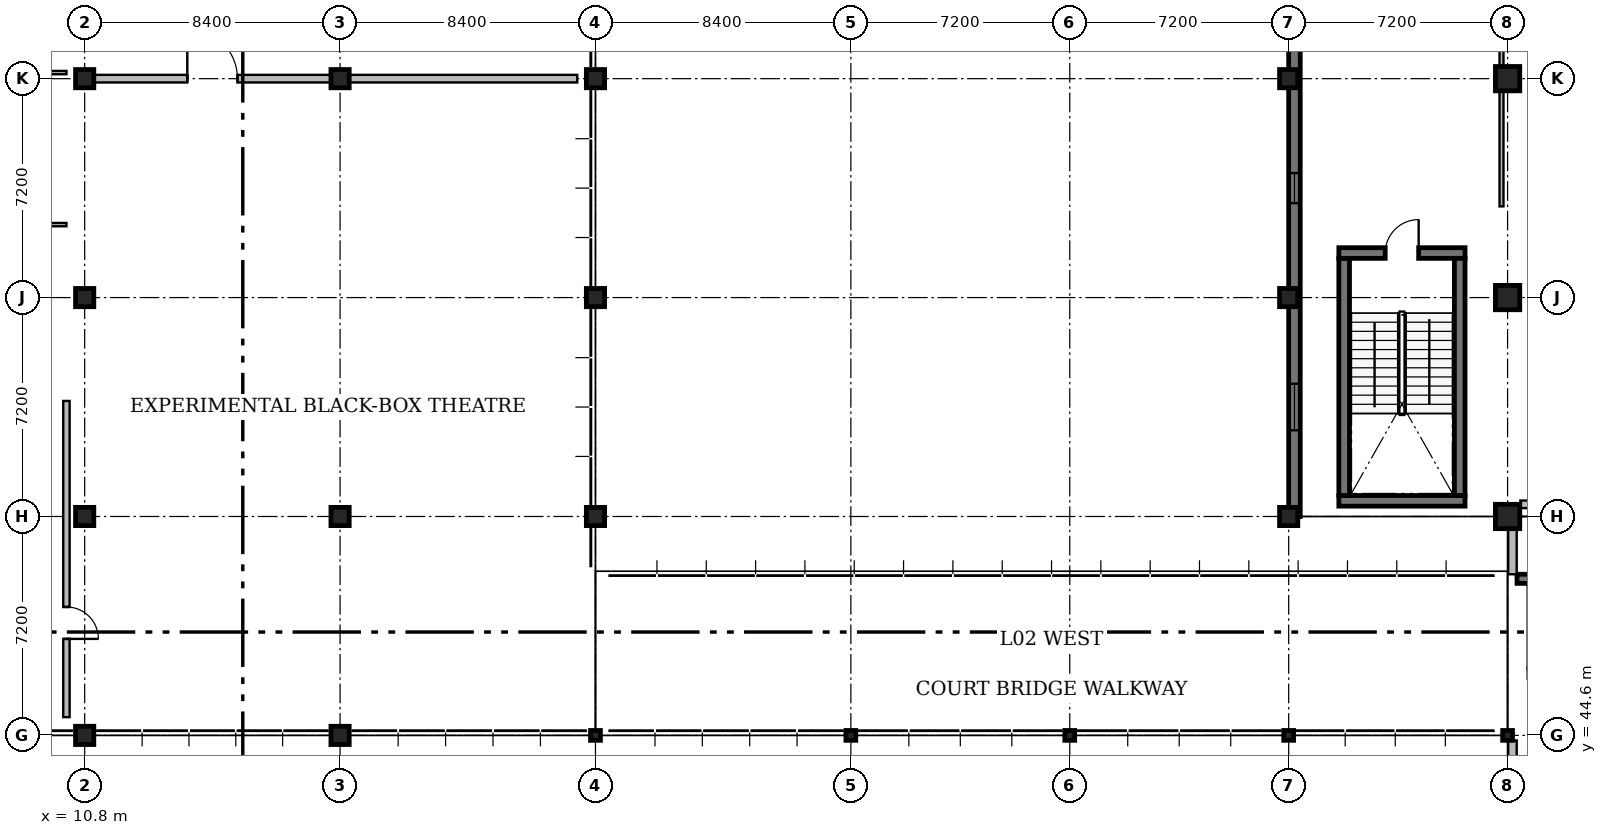
"""IFC4 building model, lengths in metres.
Left out: names, types, materials, properties, quantities, classifications, styles, units other than length and angle.
Written with IfcOpenShell. Run it as: python <this file> out.ifc"""

import sys

from ifc_helpers import new_model, si_unit, direction, frame, frame_2d, origin, origin_2d, place, context, subcontext, project, spatial, rectangle, hollow_circle, extrude, element, fill, save


model = new_model("IFC4")
c1 = context("Model", 3, precision=1e-05, world=origin(), true_north=direction((0.0, 1.0)))
c2 = subcontext(c1, "Body", "Model", "MODEL_VIEW")
j1 = project(units=[si_unit("LENGTHUNIT", "METRE"), si_unit("PLANEANGLEUNIT", "RADIAN")], contexts=[c1])
p1 = place(None, origin())
s1 = spatial("IfcSite", under=j1, at=p1, CompositionType="ELEMENT")
p2 = place(p1, origin())
s2 = spatial("IfcBuilding", under=s1, at=p2, CompositionType="ELEMENT")
p3 = place(p2, frame((0.0, 0.0, 9.0)))
s3 = spatial("IfcBuildingStorey", under=s2, at=p3, CompositionType="ELEMENT", Elevation=9.0)
for number, where, z_axis, x_axis in (
    (1, (10.8, 44.6, 0.0), (0.0, 0.0, 1.0), (1.0, 0.0, 0.0)),
    (2, (10.8, 51.8, 0.0), (0.0, 0.0, 1.0), (1.0, 0.0, 0.0)),
    (3, (10.8, 59.0, 0.0), (0.0, 0.0, 1.0), (1.0, 0.0, 0.0)),
    (4, (10.8, 66.2, 0.0), (0.0, 0.0, 1.0), (1.0, 0.0, 0.0)),
    (5, (19.2, 44.6, 0.0), (0.0, 0.0, 1.0), (1.0, 0.0, 0.0)),
    (6, (19.2, 51.8, 0.0), (0.0, 0.0, 1.0), (1.0, 0.0, 0.0)),
    (7, (19.2, 66.2, 0.0), (0.0, 0.0, 1.0), (1.0, 0.0, 0.0)),
):
    element("IfcColumn", number, at=place(p3, frame(where, z_axis=z_axis, x_axis=x_axis)), inside=s3, PredefinedType="COLUMN", context=c2, shape_type="SweptSolid", body=[
        extrude(rectangle(XDim=0.6, YDim=0.6, at=origin_2d()), origin(), (0.0, 0.0, 1.0), 4.2),
    ])
p4 = place(p3, frame((27.6, 44.6, 0.0), z_axis=(0.0, 0.0, 1.0), x_axis=(1.0, 0.0, 0.0)))
e8 = element("IfcColumn", 8, at=p4, inside=s3, PredefinedType="COLUMN", context=c2, shape_type="SweptSolid", body=[
    extrude(hollow_circle(Radius=0.162, WallThickness=0.012, at=origin_2d()), origin(), (0.0, 0.0, 1.0), 4.2),
])
for number, where, z_axis, x_axis in (
    (9, (27.6, 51.8, 0.0), (0.0, 0.0, 1.0), (1.0, 0.0, 0.0)),
    (10, (27.6, 59.0, 0.0), (0.0, 0.0, 1.0), (1.0, 0.0, 0.0)),
    (11, (27.6, 66.2, 0.0), (0.0, 0.0, 1.0), (1.0, 0.0, 0.0)),
):
    element("IfcColumn", number, at=place(p3, frame(where, z_axis=z_axis, x_axis=x_axis)), inside=s3, PredefinedType="COLUMN", context=c2, shape_type="SweptSolid", body=[
        extrude(rectangle(XDim=0.6, YDim=0.6, at=origin_2d()), origin(), (0.0, 0.0, 1.0), 4.2),
    ])
for number, where, z_axis, x_axis in (
    (12, (36.0, 44.6, 0.0), (0.0, 0.0, 1.0), (1.0, 0.0, 0.0)),
    (13, (43.2, 44.6, 0.0), (0.0, 0.0, 1.0), (1.0, 0.0, 0.0)),
    (14, (50.4, 44.6, 0.0), (0.0, 0.0, 1.0), (1.0, 0.0, 0.0)),
):
    element("IfcColumn", number, at=place(p3, frame(where, z_axis=z_axis, x_axis=x_axis)), inside=s3, PredefinedType="COLUMN", context=c2, shape_type="SweptSolid", body=[
        extrude(hollow_circle(Radius=0.162, WallThickness=0.012, at=origin_2d()), origin(), (0.0, 0.0, 1.0), 4.2),
    ])
for number, where, z_axis, x_axis in (
    (15, (50.4, 51.8, 0.0), (0.0, 0.0, 1.0), (1.0, 0.0, 0.0)),
    (16, (50.4, 59.0, 0.0), (0.0, 0.0, 1.0), (1.0, 0.0, 0.0)),
    (17, (50.4, 66.2, 0.0), (0.0, 0.0, 1.0), (1.0, 0.0, 0.0)),
):
    element("IfcColumn", number, at=place(p3, frame(where, z_axis=z_axis, x_axis=x_axis)), inside=s3, PredefinedType="COLUMN", context=c2, shape_type="SweptSolid", body=[
        extrude(rectangle(XDim=0.6, YDim=0.6, at=origin_2d()), origin(), (0.0, 0.0, 1.0), 4.2),
    ])
p5 = place(p3, frame((57.6, 44.6, 0.0), z_axis=(0.0, 0.0, 1.0), x_axis=(1.0, 0.0, 0.0)))
e18 = element("IfcColumn", 18, at=p5, inside=s3, PredefinedType="COLUMN", context=c2, shape_type="SweptSolid", body=[
    extrude(hollow_circle(Radius=0.162, WallThickness=0.012, at=origin_2d()), origin(), (0.0, 0.0, 1.0), 4.2),
])
for number, where, z_axis, x_axis in (
    (19, (57.6, 51.8, 0.0), (0.0, 0.0, 1.0), (1.0, 0.0, 0.0)),
    (20, (57.6, 59.0, 0.0), (0.0, 0.0, 1.0), (1.0, 0.0, 0.0)),
    (21, (57.6, 66.2, 0.0), (0.0, 0.0, 1.0), (1.0, 0.0, 0.0)),
):
    element("IfcColumn", number, at=place(p3, frame(where, z_axis=z_axis, x_axis=x_axis)), inside=s3, PredefinedType="COLUMN", context=c2, shape_type="SweptSolid", body=[
        extrude(rectangle(XDim=0.8, YDim=0.8, at=origin_2d()), origin(), (0.0, 0.0, 1.0), 4.2),
    ])
p6 = place(p3, frame((57.91, 49.75, 0.0), z_axis=(0.0, 0.0, 1.0), x_axis=(1.0, 0.0, 0.0)))
e22 = element("IfcWall", 22, at=p6, inside=s3, PredefinedType="SOLIDWALL", context=c2, shape_type="SweptSolid", body=[
    extrude(rectangle(XDim=3.19, YDim=0.3, at=frame_2d((1.595, 0.0))), origin(), (0.0, 0.0, 1.0), 4.5),
])
p7 = place(p3, frame((56.2, 52.315, 0.0), z_axis=(0.0, 0.0, 1.0), x_axis=(-1.0, 0.0, 0.0)))
e23 = element("IfcWall", 23, at=p7, inside=s3, PredefinedType="SOLIDWALL", context=c2, shape_type="SweptSolid", body=[
    extrude(rectangle(XDim=4.15, YDim=0.35, at=frame_2d((2.075, 0.0))), origin(), (0.0, 0.0, 1.0), 4.2),
])
p8 = place(p3, frame((52.225, 52.49, 0.0), z_axis=(0.0, 0.0, 1.0), x_axis=(0.0, 1.0, 0.0)))
e24 = element("IfcWall", 24, at=p8, inside=s3, PredefinedType="SOLIDWALL", context=c2, shape_type="SweptSolid", body=[
    extrude(rectangle(XDim=7.8, YDim=0.35, at=frame_2d((3.9, 0.0))), origin(), (0.0, 0.0, 1.0), 4.2),
])
p9 = place(p3, frame((52.05, 60.465, 0.0), z_axis=(0.0, 0.0, 1.0), x_axis=(1.0, 0.0, 0.0)))
e25 = element("IfcWall", 25, at=p9, inside=s3, PredefinedType="SOLIDWALL", context=c2, shape_type="SweptSolid", body=[
    extrude(rectangle(XDim=4.15, YDim=0.35, at=frame_2d((2.075, 0.0))), origin(), (0.0, 0.0, 1.0), 4.2),
])
p10 = place(p9, frame((1.525, 0.0, 0.0)))
e26 = element("IfcOpeningElement", 26, at=p10, cuts=e25, PredefinedType="OPENING", context=c2, shape_type="SweptSolid", body=[
    extrude(rectangle(XDim=1.1, YDim=2.15, at=frame_2d((0.55, 1.075))), frame((0.0, 0.195, 0.0), z_axis=(0.0, -1.0, 0.0), x_axis=(1.0, 0.0, 0.0)), (0.0, 0.0, 1.0), 0.39),
])
p11 = place(p3, frame((56.025, 60.29, 0.0), z_axis=(0.0, 0.0, 1.0), x_axis=(0.0, -1.0, 0.0)))
e27 = element("IfcWall", 27, at=p11, inside=s3, PredefinedType="SOLIDWALL", context=c2, shape_type="SweptSolid", body=[
    extrude(rectangle(XDim=7.8, YDim=0.35, at=frame_2d((3.9, 0.0))), origin(), (0.0, 0.0, 1.0), 4.2),
])
p12 = place(p3, frame((57.76, 37.705, 0.0), z_axis=(0.0, 0.0, 1.0), x_axis=(0.0, 1.0, 0.0)))
e28 = element("IfcWall", 28, at=p12, inside=s3, PredefinedType="SOLIDWALL", context=c2, shape_type="SweptSolid", body=[
    extrude(rectangle(XDim=6.728, YDim=0.28, at=frame_2d((3.364, 0.0))), origin(), (0.0, 0.0, 1.0), 3.673),
])
p13 = place(p12, frame((0.872, 0.0, 0.95)))
e29 = element("IfcOpeningElement", 29, at=p13, cuts=e28, PredefinedType="OPENING", context=c2, shape_type="SweptSolid", body=[
    extrude(rectangle(XDim=1.62, YDim=2.0, at=frame_2d((0.81, 1.0))), frame((0.0, 0.16, 0.0), z_axis=(0.0, -1.0, 0.0), x_axis=(1.0, 0.0, 0.0)), (0.0, 0.0, 1.0), 0.32),
])
p14 = place(p12, frame((4.236, 0.0, 0.95)))
e30 = element("IfcOpeningElement", 30, at=p14, cuts=e28, PredefinedType="OPENING", context=c2, shape_type="SweptSolid", body=[
    extrude(rectangle(XDim=1.62, YDim=2.0, at=frame_2d((0.81, 1.0))), frame((0.0, 0.16, 0.0), z_axis=(0.0, -1.0, 0.0), x_axis=(1.0, 0.0, 0.0)), (0.0, 0.0, 1.0), 0.32),
])
p15 = place(p3, frame((57.76, 49.9, 0.0), z_axis=(0.0, 0.0, 1.0), x_axis=(0.0, 1.0, 0.0)))
e31 = element("IfcWall", 31, at=p15, inside=s3, PredefinedType="SOLIDWALL", context=c2, shape_type="SweptSolid", body=[
    extrude(rectangle(XDim=1.95, YDim=0.28, at=frame_2d((0.975, 0.0))), origin(), (0.0, 0.0, 1.0), 3.573),
])
p16 = place(p3, frame((50.59, 51.8, 0.0), z_axis=(0.0, 0.0, 1.0), x_axis=(0.0, 1.0, 0.0)))
e32 = element("IfcWall", 32, at=p16, inside=s3, PredefinedType="SOLIDWALL", context=c2, shape_type="SweptSolid", body=[
    extrude(rectangle(XDim=36.0, YDim=0.38, at=frame_2d((18.0, 0.0))), origin(), (0.0, 0.0, 1.0), 3.96),
])
p17 = place(p16, frame((2.835, 0.0, 0.95)))
e33 = element("IfcOpeningElement", 33, at=p17, cuts=e32, PredefinedType="OPENING", context=c2, shape_type="SweptSolid", body=[
    extrude(rectangle(XDim=1.53, YDim=1.75, at=frame_2d((0.765, 0.875))), frame((0.0, 0.21, 0.0), z_axis=(0.0, -1.0, 0.0), x_axis=(1.0, 0.0, 0.0)), (0.0, 0.0, 1.0), 0.42),
])
p18 = place(p16, frame((10.305, 0.0, 0.95)))
e34 = element("IfcOpeningElement", 34, at=p18, cuts=e32, PredefinedType="OPENING", context=c2, shape_type="SweptSolid", body=[
    extrude(rectangle(XDim=0.99, YDim=1.8, at=frame_2d((0.495, 0.9))), frame((0.0, 0.21, 0.0), z_axis=(0.0, -1.0, 0.0), x_axis=(1.0, 0.0, 0.0)), (0.0, 0.0, 1.0), 0.42),
])
p19 = place(p16, frame((17.1, 0.0, 0.95)))
e35 = element("IfcOpeningElement", 35, at=p19, cuts=e32, PredefinedType="OPENING", context=c2, shape_type="SweptSolid", body=[
    extrude(rectangle(XDim=1.8, YDim=1.75, at=frame_2d((0.9, 0.875))), frame((0.0, 0.21, 0.0), z_axis=(0.0, -1.0, 0.0), x_axis=(1.0, 0.0, 0.0)), (0.0, 0.0, 1.0), 0.42),
])
p20 = place(p16, frame((24.66, 0.0, 0.95)))
e36 = element("IfcOpeningElement", 36, at=p20, cuts=e32, PredefinedType="OPENING", context=c2, shape_type="SweptSolid", body=[
    extrude(rectangle(XDim=1.08, YDim=1.6, at=frame_2d((0.54, 0.8))), frame((0.0, 0.21, 0.0), z_axis=(0.0, -1.0, 0.0), x_axis=(1.0, 0.0, 0.0)), (0.0, 0.0, 1.0), 0.42),
])
p21 = place(p16, frame((31.89, 0.0, 0.95)))
e37 = element("IfcOpeningElement", 37, at=p21, cuts=e32, PredefinedType="OPENING", context=c2, shape_type="SweptSolid", body=[
    extrude(rectangle(XDim=1.02, YDim=1.8, at=frame_2d((0.51, 0.9))), frame((0.0, 0.21, 0.0), z_axis=(0.0, -1.0, 0.0), x_axis=(1.0, 0.0, 0.0)), (0.0, 0.0, 1.0), 0.42),
])
p22 = place(p3, frame((62.58, 52.2, 0.0), z_axis=(0.0, 0.0, 1.0), x_axis=(-1.0, 0.0, 0.0)))
e38 = element("IfcWall", 38, at=p22, inside=s3, PredefinedType="PARTITIONING", context=c2, shape_type="SweptSolid", body=[
    extrude(rectangle(XDim=4.56, YDim=0.25, at=frame_2d((2.28, 0.0))), origin(), (0.0, 0.0, 1.0), 3.95),
])
p23 = place(p3, frame((11.12, 66.2, 0.0), z_axis=(0.0, 0.0, 1.0), x_axis=(1.0, 0.0, 0.0)))
e39 = element("IfcWall", 39, at=p23, inside=s3, PredefinedType="PARTITIONING", context=c2, shape_type="SweptSolid", body=[
    extrude(rectangle(XDim=7.76, YDim=0.25, at=frame_2d((3.88, 0.0))), origin(), (0.0, 0.0, 1.0), 3.52),
])
p24 = place(p23, frame((3.055, 0.0, 0.0)))
e40 = element("IfcOpeningElement", 40, at=p24, cuts=e39, PredefinedType="OPENING", context=c2, shape_type="SweptSolid", body=[
    extrude(rectangle(XDim=1.65, YDim=2.25, at=frame_2d((0.825, 1.125))), frame((0.0, 0.145, 0.0), z_axis=(0.0, -1.0, 0.0), x_axis=(1.0, 0.0, 0.0)), (0.0, 0.0, 1.0), 0.29),
])
p25 = place(p3, frame((19.52, 66.2, 0.0), z_axis=(0.0, 0.0, 1.0), x_axis=(1.0, 0.0, 0.0)))
e41 = element("IfcWall", 41, at=p25, inside=s3, PredefinedType="PARTITIONING", context=c2, shape_type="SweptSolid", body=[
    extrude(rectangle(XDim=7.48, YDim=0.25, at=frame_2d((3.74, 0.0))), origin(), (0.0, 0.0, 1.0), 3.95),
])
p26 = place(p3, frame((10.2, 55.6, 0.0), z_axis=(0.0, 0.0, 1.0), x_axis=(0.0, -1.0, 0.0)))
e42 = element("IfcWall", 42, at=p26, inside=s3, PredefinedType="PARTITIONING", context=c2, shape_type="SweptSolid", body=[
    extrude(rectangle(XDim=10.4, YDim=0.21, at=frame_2d((5.2, 0.0))), origin(), (0.0, 0.0, 1.0), 3.97),
])
p27 = place(p26, frame((6.776, 0.0, 0.0)))
e43 = element("IfcOpeningElement", 43, at=p27, cuts=e42, PredefinedType="OPENING", context=c2, shape_type="SweptSolid", body=[
    extrude(rectangle(XDim=1.05, YDim=2.15, at=frame_2d((0.525, 1.075))), frame((0.0, 0.125, 0.0), z_axis=(0.0, -1.0, 0.0), x_axis=(1.0, 0.0, 0.0)), (0.0, 0.0, 1.0), 0.25),
])
p28 = place(p3, frame((3.0, 61.4, 0.0), z_axis=(0.0, 0.0, 1.0), x_axis=(1.0, 0.0, 0.0)))
e44 = element("IfcWall", 44, at=p28, inside=s3, PredefinedType="PARTITIONING", context=c2, shape_type="SweptSolid", body=[
    extrude(rectangle(XDim=7.2, YDim=0.11, at=frame_2d((3.6, 0.0))), origin(), (0.0, 0.0, 1.0), 3.95),
])
p29 = place(p28, frame((3.028, 0.0, 0.0)))
e45 = element("IfcOpeningElement", 45, at=p29, cuts=e44, PredefinedType="OPENING", context=c2, shape_type="SweptSolid", body=[
    extrude(rectangle(XDim=0.9, YDim=2.15, at=frame_2d((0.45, 1.075))), frame((0.0, 0.075, 0.0), z_axis=(0.0, -1.0, 0.0), x_axis=(1.0, 0.0, 0.0)), (0.0, 0.0, 1.0), 0.15),
])
p30 = place(p3, frame((3.0, 66.4, 0.0), z_axis=(0.0, 0.0, 1.0), x_axis=(1.0, 0.0, 0.0)))
e46 = element("IfcWall", 46, at=p30, inside=s3, PredefinedType="PARTITIONING", context=c2, shape_type="SweptSolid", body=[
    extrude(rectangle(XDim=7.2, YDim=0.11, at=frame_2d((3.6, 0.0))), origin(), (0.0, 0.0, 1.0), 3.52),
])
p31 = place(p30, frame((3.004, 0.0, 0.0)))
e47 = element("IfcOpeningElement", 47, at=p31, cuts=e46, PredefinedType="OPENING", context=c2, shape_type="SweptSolid", body=[
    extrude(rectangle(XDim=0.95, YDim=2.1, at=frame_2d((0.475, 1.05))), frame((0.0, 0.075, 0.0), z_axis=(0.0, -1.0, 0.0), x_axis=(1.0, 0.0, 0.0)), (0.0, 0.0, 1.0), 0.15),
])
p32 = place(p3, frame((57.4, 72.98, 0.0), z_axis=(0.0, 0.0, 1.0), x_axis=(0.0, -1.0, 0.0)))
e48 = element("IfcWall", 48, at=p32, inside=s3, PredefinedType="PARTITIONING", context=c2, shape_type="SweptSolid", body=[
    extrude(rectangle(XDim=6.36, YDim=0.13, at=frame_2d((3.18, 0.0))), origin(), (0.0, 0.0, 1.0), 3.65),
])
p33 = place(p3, frame((57.4, 65.78, 0.0), z_axis=(0.0, 0.0, 1.0), x_axis=(0.0, -1.0, 0.0)))
e49 = element("IfcWall", 49, at=p33, inside=s3, PredefinedType="PARTITIONING", context=c2, shape_type="SweptSolid", body=[
    extrude(rectangle(XDim=3.78, YDim=0.13, at=frame_2d((1.89, 0.0))), origin(), (0.0, 0.0, 1.0), 3.65),
])
p34 = place(p10, origin())
e50 = element("IfcDoor", 50, at=p34, inside=s3, OperationType="SINGLE_SWING_RIGHT", PredefinedType="DOOR", context=c2, shape_type="SweptSolid", body=[
    extrude(rectangle(XDim=1.1, YDim=2.15, at=frame_2d((0.55, 1.075))), frame((0.0, 0.025, 0.0), z_axis=(0.0, -1.0, 0.0), x_axis=(1.0, 0.0, 0.0)), (0.0, 0.0, 1.0), 0.05),
])
fill(e26, e50)
p35 = place(p17, origin())
e51 = element("IfcWindow", 51, at=p35, inside=s3, PartitioningType="SINGLE_PANEL", PredefinedType="WINDOW", context=c2, shape_type="SweptSolid", body=[
    extrude(rectangle(XDim=1.53, YDim=1.75, at=frame_2d((0.765, 0.875))), frame((0.0, 0.03, 0.0), z_axis=(0.0, -1.0, 0.0), x_axis=(1.0, 0.0, 0.0)), (0.0, 0.0, 1.0), 0.06),
])
fill(e33, e51)
p36 = place(p18, origin())
e52 = element("IfcWindow", 52, at=p36, inside=s3, PartitioningType="SINGLE_PANEL", PredefinedType="WINDOW", context=c2, shape_type="SweptSolid", body=[
    extrude(rectangle(XDim=0.99, YDim=1.8, at=frame_2d((0.495, 0.9))), frame((0.0, 0.03, 0.0), z_axis=(0.0, -1.0, 0.0), x_axis=(1.0, 0.0, 0.0)), (0.0, 0.0, 1.0), 0.06),
])
fill(e34, e52)
p37 = place(p24, origin())
e53 = element("IfcDoor", 53, at=p37, inside=s3, OperationType="DOUBLE_DOOR_SINGLE_SWING", PredefinedType="DOOR", context=c2, shape_type="SweptSolid", body=[
    extrude(rectangle(XDim=1.65, YDim=2.25, at=frame_2d((0.825, 1.125))), frame((0.0, 0.025, 0.0), z_axis=(0.0, -1.0, 0.0), x_axis=(1.0, 0.0, 0.0)), (0.0, 0.0, 1.0), 0.05),
])
fill(e40, e53)
p38 = place(p27, origin())
e54 = element("IfcDoor", 54, at=p38, inside=s3, OperationType="SINGLE_SWING_RIGHT", PredefinedType="DOOR", context=c2, shape_type="SweptSolid", body=[
    extrude(rectangle(XDim=1.05, YDim=2.15, at=frame_2d((0.525, 1.075))), frame((0.0, 0.025, 0.0), z_axis=(0.0, -1.0, 0.0), x_axis=(1.0, 0.0, 0.0)), (0.0, 0.0, 1.0), 0.05),
])
fill(e43, e54)
save(model, sys.argv[1])
